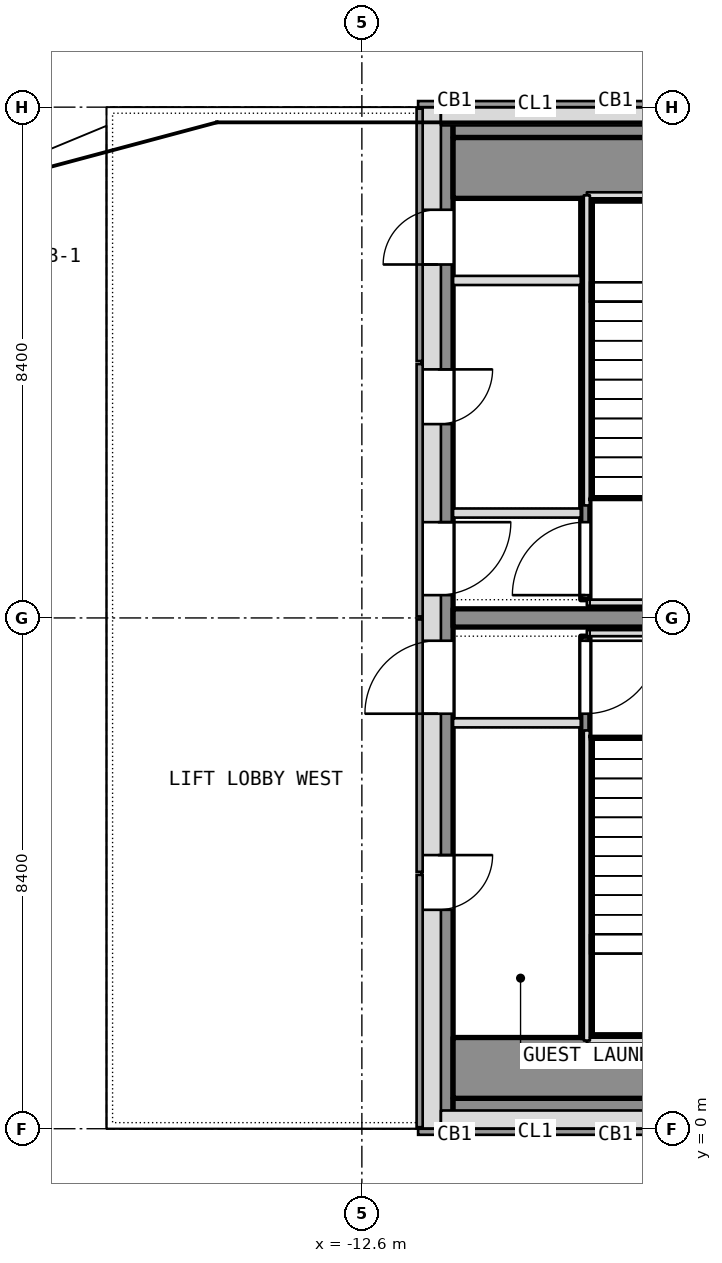
"""IFC4 building model, lengths in metres.
Left out: names, types, materials, properties, quantities, classifications, styles, units other than length and angle.
Written with IfcOpenShell. Run it as: python <this file> out.ifc"""

import sys

from ifc_helpers import new_model, si_unit, direction, frame, frame_2d, origin, place, context, subcontext, project, spatial, rectangle, extrude, element, fill, save


model = new_model("IFC4")
c1 = context("Model", 3, precision=1e-05, world=origin(), true_north=direction((0.0, 1.0)))
c2 = subcontext(c1, "Body", "Model", "MODEL_VIEW")
j1 = project(units=[si_unit("LENGTHUNIT", "METRE"), si_unit("PLANEANGLEUNIT", "RADIAN")], contexts=[c1])
p1 = place(None, origin())
s1 = spatial("IfcSite", under=j1, at=p1, CompositionType="ELEMENT")
p2 = place(p1, origin())
s2 = spatial("IfcBuilding", under=s1, at=p2, CompositionType="ELEMENT")
p3 = place(p2, frame((0.0, 0.0, 295.7)))
s3 = spatial("IfcBuildingStorey", under=s2, at=p3, CompositionType="ELEMENT", Elevation=295.7)
p4 = place(p3, frame((-11.35, 0.0, 0.0), z_axis=(0.0, 0.0, 1.0), x_axis=(0.0, 1.0, 0.0)))
e1 = element("IfcWall", 1, at=p4, inside=s3, PredefinedType="SHEAR", context=c2, shape_type="SweptSolid", body=[
    extrude(rectangle(XDim=16.8, YDim=0.5, at=frame_2d((8.4, 0.0))), origin(), (0.0, 0.0, 1.0), 14.0),
])
p5 = place(p4, frame((3.6, 0.0, 0.0)))
e2 = element("IfcOpeningElement", 2, at=p5, cuts=e1, PredefinedType="OPENING", context=c2, shape_type="SweptSolid", body=[
    extrude(rectangle(XDim=0.9, YDim=2.1, at=frame_2d((0.45, 1.05))), frame((0.0, 0.25, 0.0), z_axis=(0.0, -1.0, 0.0), x_axis=(1.0, 0.0, 0.0)), (0.0, 0.0, 1.0), 0.5),
])
p6 = place(p4, frame((6.825, 0.0, 0.0)))
e3 = element("IfcOpeningElement", 3, at=p6, cuts=e1, PredefinedType="OPENING", context=c2, shape_type="SweptSolid", body=[
    extrude(rectangle(XDim=1.2, YDim=2.1, at=frame_2d((0.6, 1.05))), frame((0.0, 0.25, 0.0), z_axis=(0.0, -1.0, 0.0), x_axis=(1.0, 0.0, 0.0)), (0.0, 0.0, 1.0), 0.5),
])
p7 = place(p4, frame((14.212, 0.0, 0.0)))
e4 = element("IfcOpeningElement", 4, at=p7, cuts=e1, PredefinedType="OPENING", context=c2, shape_type="SweptSolid", body=[
    extrude(rectangle(XDim=0.9, YDim=2.1, at=frame_2d((0.45, 1.05))), frame((0.0, 0.25, 0.0), z_axis=(0.0, -1.0, 0.0), x_axis=(1.0, 0.0, 0.0)), (0.0, 0.0, 1.0), 0.5),
])
p8 = place(p4, frame((11.587, 0.0, 0.0)))
e5 = element("IfcOpeningElement", 5, at=p8, cuts=e1, PredefinedType="OPENING", context=c2, shape_type="SweptSolid", body=[
    extrude(rectangle(XDim=0.9, YDim=2.1, at=frame_2d((0.45, 1.05))), frame((0.0, 0.25, 0.0), z_axis=(0.0, -1.0, 0.0), x_axis=(1.0, 0.0, 0.0)), (0.0, 0.0, 1.0), 0.5),
])
p9 = place(p4, frame((8.775, 0.0, 0.0)))
e6 = element("IfcOpeningElement", 6, at=p9, cuts=e1, PredefinedType="OPENING", context=c2, shape_type="SweptSolid", body=[
    extrude(rectangle(XDim=1.2, YDim=2.1, at=frame_2d((0.6, 1.05))), frame((0.0, 0.25, 0.0), z_axis=(0.0, -1.0, 0.0), x_axis=(1.0, 0.0, 0.0)), (0.0, 0.0, 1.0), 0.5),
])
for number, where, z_axis, x_axis in (
    (7, (-11.1, 0.25, 0.0), (0.0, 0.0, 1.0), (1.0, 0.0, 0.0)),
    (8, (-11.1, 16.55, 0.0), (0.0, 0.0, 1.0), (1.0, 0.0, 0.0)),
):
    element("IfcWall", number, at=place(p3, frame(where, z_axis=z_axis, x_axis=x_axis)), inside=s3, PredefinedType="SHEAR", context=c2, shape_type="SweptSolid", body=[
        extrude(rectangle(XDim=22.2, YDim=0.5, at=frame_2d((11.1, 0.0))), origin(), (0.0, 0.0, 1.0), 14.0),
    ])
p10 = place(p3, frame((-11.1, 8.4, 0.0), z_axis=(0.0, 0.0, 1.0), x_axis=(1.0, 0.0, 0.0)))
e9 = element("IfcWall", 9, at=p10, inside=s3, PredefinedType="SHEAR", context=c2, shape_type="SweptSolid", body=[
    extrude(rectangle(XDim=6.75, YDim=0.3, at=frame_2d((3.375, 0.0))), origin(), (0.0, 0.0, 1.0), 14.0),
])
for number, where, z_axis, x_axis in (
    (10, (-11.1, 1.0, 0.0), (0.0, 0.0, 1.0), (1.0, 0.0, 0.0)),
    (11, (-11.1, 15.8, 0.0), (0.0, 0.0, 1.0), (1.0, 0.0, 0.0)),
):
    element("IfcWall", number, at=place(p3, frame(where, z_axis=z_axis, x_axis=x_axis)), inside=s3, PredefinedType="PARTITIONING", context=c2, shape_type="SweptSolid", body=[
        extrude(rectangle(XDim=22.2, YDim=1.0, at=frame_2d((11.1, 0.0))), origin(), (0.0, 0.0, 1.0), 13.7),
    ])
p11 = place(p3, frame((-8.925, 1.5, 0.0), z_axis=(0.0, 0.0, 1.0), x_axis=(0.0, 1.0, 0.0)))
e12 = element("IfcWall", 12, at=p11, inside=s3, PredefinedType="SHEAR", context=c2, shape_type="SweptSolid", body=[
    extrude(rectangle(XDim=6.6, YDim=0.15, at=frame_2d((3.3, 0.0))), origin(), (0.0, 0.0, 1.0), 13.7),
])
p12 = place(p11, frame((5.325, 0.0, 0.0)))
e13 = element("IfcOpeningElement", 13, at=p12, cuts=e12, PredefinedType="OPENING", context=c2, shape_type="SweptSolid", body=[
    extrude(rectangle(XDim=1.2, YDim=2.1, at=frame_2d((0.6, 1.05))), frame((0.0, 0.075, 0.0), z_axis=(0.0, -1.0, 0.0), x_axis=(1.0, 0.0, 0.0)), (0.0, 0.0, 1.0), 0.15),
])
p13 = place(p3, frame((-11.1, 6.675, 0.0), z_axis=(0.0, 0.0, 1.0), x_axis=(1.0, 0.0, 0.0)))
e14 = element("IfcWall", 14, at=p13, inside=s3, PredefinedType="PARTITIONING", context=c2, shape_type="SweptSolid", body=[
    extrude(rectangle(XDim=2.1, YDim=0.15, at=frame_2d((1.05, 0.0))), origin(), (0.0, 0.0, 1.0), 13.7),
])
p14 = place(p3, frame((-8.925, 8.7, 0.0), z_axis=(0.0, 0.0, 1.0), x_axis=(0.0, 1.0, 0.0)))
e15 = element("IfcWall", 15, at=p14, inside=s3, PredefinedType="SHEAR", context=c2, shape_type="SweptSolid", body=[
    extrude(rectangle(XDim=6.6, YDim=0.15, at=frame_2d((3.3, 0.0))), origin(), (0.0, 0.0, 1.0), 13.7),
])
p15 = place(p14, frame((0.075, 0.0, 0.0)))
e16 = element("IfcOpeningElement", 16, at=p15, cuts=e15, PredefinedType="OPENING", context=c2, shape_type="SweptSolid", body=[
    extrude(rectangle(XDim=1.2, YDim=2.1, at=frame_2d((0.6, 1.05))), frame((0.0, 0.075, 0.0), z_axis=(0.0, -1.0, 0.0), x_axis=(1.0, 0.0, 0.0)), (0.0, 0.0, 1.0), 0.15),
])
for number, where, z_axis, x_axis in (
    (17, (-11.1, 10.125, 0.0), (0.0, 0.0, 1.0), (1.0, 0.0, 0.0)),
    (18, (-11.1, 13.95, 0.0), (0.0, 0.0, 1.0), (1.0, 0.0, 0.0)),
):
    element("IfcWall", number, at=place(p3, frame(where, z_axis=z_axis, x_axis=x_axis)), inside=s3, PredefinedType="PARTITIONING", context=c2, shape_type="SweptSolid", body=[
        extrude(rectangle(XDim=2.1, YDim=0.15, at=frame_2d((1.05, 0.0))), origin(), (0.0, 0.0, 1.0), 13.7),
    ])
p16 = place(p5, origin())
e19 = element("IfcDoor", 19, at=p16, inside=s3, OperationType="SINGLE_SWING_LEFT", PredefinedType="DOOR", context=c2, shape_type="SweptSolid", body=[
    extrude(rectangle(XDim=0.9, YDim=2.1, at=frame_2d((0.45, 1.05))), frame((0.0, 0.025, 0.0), z_axis=(0.0, -1.0, 0.0), x_axis=(1.0, 0.0, 0.0)), (0.0, 0.0, 1.0), 0.05),
])
fill(e2, e19)
p17 = place(p6, origin())
e20 = element("IfcDoor", 20, at=p17, inside=s3, OperationType="SINGLE_SWING_LEFT", PredefinedType="DOOR", context=c2, shape_type="SweptSolid", body=[
    extrude(rectangle(XDim=1.2, YDim=2.1, at=frame_2d((0.6, 1.05))), frame((0.0, 0.025, 0.0), z_axis=(0.0, -1.0, 0.0), x_axis=(1.0, 0.0, 0.0)), (0.0, 0.0, 1.0), 0.05),
])
fill(e3, e20)
p18 = place(p12, origin())
e21 = element("IfcDoor", 21, at=p18, inside=s3, OperationType="SINGLE_SWING_LEFT", PredefinedType="DOOR", context=c2, shape_type="SweptSolid", body=[
    extrude(rectangle(XDim=1.2, YDim=2.1, at=frame_2d((0.6, 1.05))), frame((0.0, 0.025, 0.0), z_axis=(0.0, -1.0, 0.0), x_axis=(1.0, 0.0, 0.0)), (0.0, 0.0, 1.0), 0.05),
])
fill(e13, e21)
p19 = place(p7, origin())
e22 = element("IfcDoor", 22, at=p19, inside=s3, OperationType="SINGLE_SWING_LEFT", PredefinedType="DOOR", context=c2, shape_type="SweptSolid", body=[
    extrude(rectangle(XDim=0.9, YDim=2.1, at=frame_2d((0.45, 1.05))), frame((0.0, 0.025, 0.0), z_axis=(0.0, -1.0, 0.0), x_axis=(1.0, 0.0, 0.0)), (0.0, 0.0, 1.0), 0.05),
])
fill(e4, e22)
p20 = place(p8, origin())
e23 = element("IfcDoor", 23, at=p20, inside=s3, OperationType="SINGLE_SWING_LEFT", PredefinedType="DOOR", context=c2, shape_type="SweptSolid", body=[
    extrude(rectangle(XDim=0.9, YDim=2.1, at=frame_2d((0.45, 1.05))), frame((0.0, 0.025, 0.0), z_axis=(0.0, -1.0, 0.0), x_axis=(1.0, 0.0, 0.0)), (0.0, 0.0, 1.0), 0.05),
])
fill(e5, e23)
p21 = place(p9, origin())
e24 = element("IfcDoor", 24, at=p21, inside=s3, OperationType="SINGLE_SWING_LEFT", PredefinedType="DOOR", context=c2, shape_type="SweptSolid", body=[
    extrude(rectangle(XDim=1.2, YDim=2.1, at=frame_2d((0.6, 1.05))), frame((0.0, 0.025, 0.0), z_axis=(0.0, -1.0, 0.0), x_axis=(1.0, 0.0, 0.0)), (0.0, 0.0, 1.0), 0.05),
])
fill(e6, e24)
p22 = place(p15, origin())
e25 = element("IfcDoor", 25, at=p22, inside=s3, OperationType="SINGLE_SWING_LEFT", PredefinedType="DOOR", context=c2, shape_type="SweptSolid", body=[
    extrude(rectangle(XDim=1.2, YDim=2.1, at=frame_2d((0.6, 1.05))), frame((0.0, 0.025, 0.0), z_axis=(0.0, -1.0, 0.0), x_axis=(1.0, 0.0, 0.0)), (0.0, 0.0, 1.0), 0.05),
])
fill(e16, e25)
save(model, sys.argv[1])
